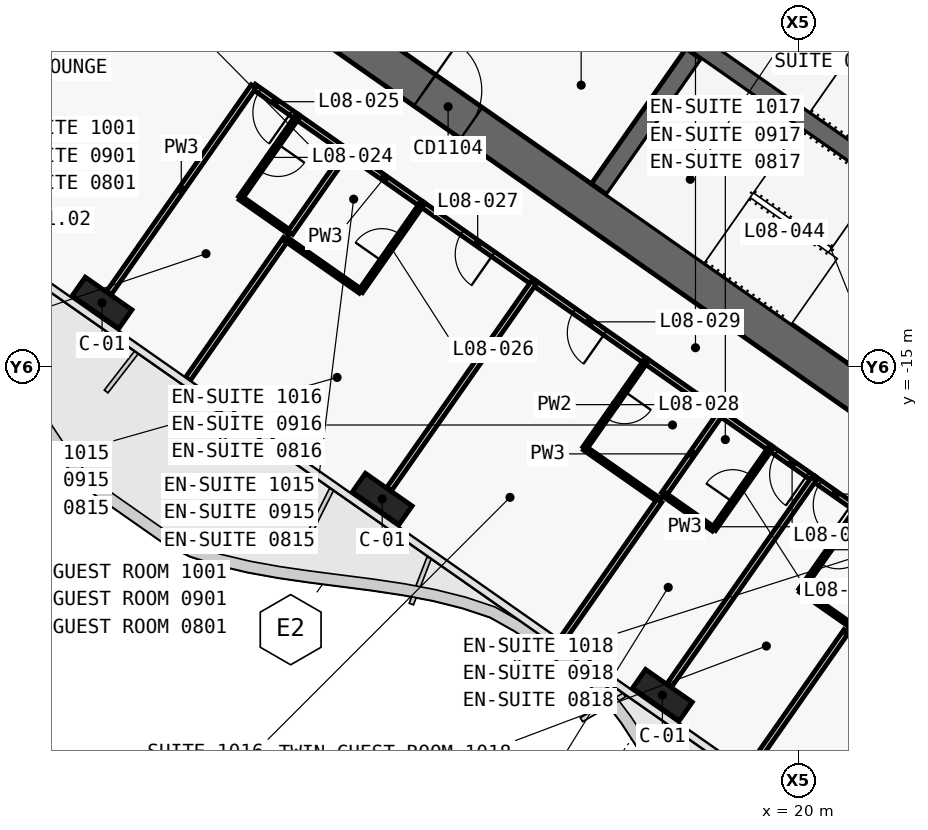
"""IFC4 building model, lengths in metres.
Left out: names, types, materials, properties, quantities, classifications, styles, units other than length and angle.
Written with IfcOpenShell. Run it as: python <this file> out.ifc"""

import sys

from ifc_helpers import new_model, si_unit, direction, frame, frame_2d, origin, origin_2d, place, context, subcontext, project, spatial, polyline, rectangle, outline, extrude, element, fill, save


model = new_model("IFC4")
c1 = context("Model", 3, precision=1e-05, world=origin(), true_north=direction((0.0, 1.0)))
c2 = subcontext(c1, "Body", "Model", "MODEL_VIEW")
j1 = project(units=[si_unit("LENGTHUNIT", "METRE"), si_unit("PLANEANGLEUNIT", "RADIAN")], contexts=[c1])
p1 = place(None, origin())
s1 = spatial("IfcSite", under=j1, at=p1, CompositionType="ELEMENT")
p2 = place(p1, origin())
s2 = spatial("IfcBuilding", under=s1, at=p2, CompositionType="ELEMENT")
p3 = place(p2, frame((0.0, 0.0, 54.5)))
s3 = spatial("IfcBuildingStorey", under=s2, at=p3, CompositionType="ELEMENT", Elevation=54.5)
p4 = place(p3, frame((-0.037, 11.867, 0.0), z_axis=(0.0, 0.0, 1.0), x_axis=(0.819155306259, -0.573571777746, 0.0)))
e1 = element("IfcWall", 1, at=p4, inside=s3, PredefinedType="SHEAR", context=c2, shape_type="SweptSolid", body=[
    extrude(outline(polyline([(33.837, 0.5), (0.0, 0.5), (0.7, -0.5), (33.837, -0.5), (33.837, 0.5)])), origin(), (0.0, 0.0, 1.0), 3.6),
])
p5 = place(p3, frame((-0.037, -0.585, 0.0), z_axis=(0.0, 0.0, 1.0), x_axis=(0.819157152511, -0.573569140985, 0.0)))
e2 = element("IfcWall", 2, at=p5, inside=s3, PredefinedType="SHEAR", context=c2, shape_type="SweptSolid", body=[
    extrude(outline(polyline([(26.695, 0.5), (0.0, 0.5), (0.7, -0.5), (26.695, -0.5), (26.695, 0.5)])), origin(), (0.0, 0.0, 1.0), 3.6),
])
p6 = place(p5, frame((6.695, 0.0, 0.0)))
e3 = element("IfcOpeningElement", 3, at=p6, cuts=e2, PredefinedType="OPENING", context=c2, shape_type="SweptSolid", body=[
    extrude(rectangle(XDim=1.5, YDim=2.1, at=frame_2d((0.75, 1.05))), frame((0.0, 0.51, 0.0), z_axis=(0.0, -1.0, 0.0), x_axis=(1.0, 0.0, 0.0)), (0.0, 0.0, 1.0), 1.02),
])
p7 = place(p5, frame((12.445, 0.0, 0.0)))
e4 = element("IfcOpeningElement", 4, at=p7, cuts=e2, PredefinedType="OPENING", context=c2, shape_type="SweptSolid", body=[
    extrude(rectangle(XDim=1.5, YDim=2.1, at=frame_2d((0.75, 1.05))), frame((0.0, 0.51, 0.0), z_axis=(0.0, -1.0, 0.0), x_axis=(1.0, 0.0, 0.0)), (0.0, 0.0, 1.0), 1.02),
])
p8 = place(p3, frame((14.745, -10.324, 0.0), z_axis=(0.0, 0.0, 1.0), x_axis=(0.57356780395, 0.819158088694, 0.0)))
e5 = element("IfcWall", 5, at=p8, inside=s3, PredefinedType="SHEAR", context=c2, shape_type="SweptSolid", body=[
    extrude(outline(polyline([(0.0, 0.25), (0.0, -0.25), (4.35, -0.25), (4.35, 0.25), (0.0, 0.25)])), origin(), (0.0, 0.0, 1.0), 3.6),
])
p9 = place(p3, frame((2.638, 3.768, 0.0), z_axis=(0.0, 0.0, 1.0), x_axis=(0.819148977158, -0.573580816643, 0.0)))
e6 = element("IfcWall", 6, at=p9, inside=s3, PredefinedType="SHEAR", context=c2, shape_type="SweptSolid", body=[
    extrude(outline(polyline([(0.0, 0.25), (0.0, -0.25), (26.0, -0.25), (26.0, 0.25), (0.0, 0.25)])), origin(), (0.0, 0.0, 1.0), 3.6),
])
p10 = place(p9, frame((9.637, 0.0, 0.0)))
e7 = element("IfcOpeningElement", 7, at=p10, cuts=e6, PredefinedType="OPENING", context=c2, shape_type="SweptSolid", body=[
    extrude(rectangle(XDim=1.2, YDim=2.1, at=frame_2d((0.6, 1.05))), frame((0.0, 0.26, 0.0), z_axis=(0.0, -1.0, 0.0), x_axis=(1.0, 0.0, 0.0)), (0.0, 0.0, 1.0), 0.52),
])
p11 = place(p9, frame((11.812, 0.0, 0.0)))
e8 = element("IfcOpeningElement", 8, at=p11, cuts=e6, PredefinedType="OPENING", context=c2, shape_type="SweptSolid", body=[
    extrude(rectangle(XDim=1.2, YDim=2.1, at=frame_2d((0.6, 1.05))), frame((0.0, 0.26, 0.0), z_axis=(0.0, -1.0, 0.0), x_axis=(1.0, 0.0, 0.0)), (0.0, 0.0, 1.0), 0.52),
])
p12 = place(p9, frame((13.988, 0.0, 0.0)))
e9 = element("IfcOpeningElement", 9, at=p12, cuts=e6, PredefinedType="OPENING", context=c2, shape_type="SweptSolid", body=[
    extrude(rectangle(XDim=1.2, YDim=2.1, at=frame_2d((0.6, 1.05))), frame((0.0, 0.26, 0.0), z_axis=(0.0, -1.0, 0.0), x_axis=(1.0, 0.0, 0.0)), (0.0, 0.0, 1.0), 0.52),
])
p13 = place(p9, frame((16.262, 0.0, 0.0)))
e10 = element("IfcOpeningElement", 10, at=p13, cuts=e6, PredefinedType="OPENING", context=c2, shape_type="SweptSolid", body=[
    extrude(rectangle(XDim=1.0, YDim=2.1, at=frame_2d((0.5, 1.05))), frame((0.0, 0.26, 0.0), z_axis=(0.0, -1.0, 0.0), x_axis=(1.0, 0.0, 0.0)), (0.0, 0.0, 1.0), 0.52),
])
for number, where, z_axis, x_axis in (
    (11, (1.665, -13.313, 0.0), (0.0, 0.0, 1.0), (0.819, -0.574, 0.0)),
    (12, (9.038, -18.475, 0.0), (0.0, 0.0, 1.0), (0.819, -0.574, 0.0)),
    (13, (16.41, -23.637, 0.0), (0.0, 0.0, 1.0), (0.819, -0.574, 0.0)),
):
    element("IfcColumn", number, at=place(p3, frame(where, z_axis=z_axis, x_axis=x_axis)), inside=s3, PredefinedType="COLUMN", context=c2, shape_type="SweptSolid", body=[
        extrude(rectangle(XDim=1.5, YDim=0.6, at=origin_2d()), origin(), (0.0, 0.0, 1.0), 3.6),
    ])
p14 = place(p3, frame((6.799, -8.423, 0.0), z_axis=(0.0, 0.0, 1.0), x_axis=(-0.819207359301, 0.573497430219, 0.0)))
e14 = element("IfcWall", 14, at=p14, inside=s3, PredefinedType="PARTITIONING", context=c2, shape_type="SweptSolid", body=[
    extrude(rectangle(XDim=1.401, YDim=0.15, at=frame_2d((0.7, 0.0))), origin(), (0.0, 0.0, 1.0), 2.6),
])
p15 = place(p14, frame((0.201, 0.0, 0.0)))
e15 = element("IfcOpeningElement", 15, at=p15, cuts=e14, PredefinedType="OPENING", context=c2, shape_type="SweptSolid", body=[
    extrude(rectangle(XDim=1.0, YDim=2.1, at=frame_2d((0.5, 1.05))), frame((0.0, 0.085, 0.0), z_axis=(0.0, -1.0, 0.0), x_axis=(1.0, 0.0, 0.0)), (0.0, 0.0, 1.0), 0.17),
])
p16 = place(p3, frame((8.111, -9.342, 0.0), z_axis=(0.0, 0.0, 1.0), x_axis=(-0.8190674132, 0.573697283098, 0.0)))
e16 = element("IfcWall", 16, at=p16, inside=s3, PredefinedType="PARTITIONING", context=c2, shape_type="SweptSolid", body=[
    extrude(rectangle(XDim=1.604, YDim=0.15, at=frame_2d((0.802, 0.0))), origin(), (0.0, 0.0, 1.0), 3.32),
])
p17 = place(p3, frame((13.026, -12.783, 0.0), z_axis=(0.0, 0.0, 1.0), x_axis=(-0.819145961204, 0.573585123798, 0.0)))
e17 = element("IfcWall", 17, at=p17, inside=s3, PredefinedType="PARTITIONING", context=c2, shape_type="SweptSolid", body=[
    extrude(rectangle(XDim=3.603, YDim=0.15, at=frame_2d((1.802, 0.0))), origin(), (0.0, 0.0, 1.0), 2.6),
])
p18 = place(p17, frame((1.302, 0.0, 0.0)))
e18 = element("IfcOpeningElement", 18, at=p18, cuts=e17, PredefinedType="OPENING", context=c2, shape_type="SweptSolid", body=[
    extrude(rectangle(XDim=1.0, YDim=2.1, at=frame_2d((0.5, 1.05))), frame((0.0, 0.085, 0.0), z_axis=(0.0, -1.0, 0.0), x_axis=(1.0, 0.0, 0.0)), (0.0, 0.0, 1.0), 0.17),
])
p19 = place(p3, frame((10.077, -10.718, 0.0), z_axis=(0.0, 0.0, 1.0), x_axis=(-0.819146032251, 0.573585022335, 0.0)))
e19 = element("IfcWall", 19, at=p19, inside=s3, PredefinedType="PARTITIONING", context=c2, shape_type="SweptSolid", body=[
    extrude(rectangle(XDim=2.404, YDim=0.15, at=frame_2d((1.202, 0.0))), origin(), (0.0, 0.0, 1.0), 3.32),
])
p20 = place(p3, frame((15.974, -14.847, 0.0), z_axis=(0.0, 0.0, 1.0), x_axis=(-0.819145961204, 0.573585123798, 0.0)))
e20 = element("IfcWall", 20, at=p20, inside=s3, PredefinedType="PARTITIONING", context=c2, shape_type="SweptSolid", body=[
    extrude(rectangle(XDim=3.603, YDim=0.15, at=frame_2d((1.802, 0.0))), origin(), (0.0, 0.0, 1.0), 2.6),
])
p21 = place(p20, frame((1.301, 0.0, 0.0)))
e21 = element("IfcOpeningElement", 21, at=p21, cuts=e20, PredefinedType="OPENING", context=c2, shape_type="SweptSolid", body=[
    extrude(rectangle(XDim=1.0, YDim=2.1, at=frame_2d((0.5, 1.05))), frame((0.0, 0.085, 0.0), z_axis=(0.0, -1.0, 0.0), x_axis=(1.0, 0.0, 0.0)), (0.0, 0.0, 1.0), 0.17),
])
p22 = place(p3, frame((17.941, -16.224, 0.0), z_axis=(0.0, 0.0, 1.0), x_axis=(-0.81922714955, 0.573469159974, 0.0)))
e22 = element("IfcWall", 22, at=p22, inside=s3, PredefinedType="PARTITIONING", context=c2, shape_type="SweptSolid", body=[
    extrude(rectangle(XDim=2.404, YDim=0.15, at=frame_2d((1.202, 0.0))), origin(), (0.0, 0.0, 1.0), 3.32),
])
p23 = place(p3, frame((20.398, -17.945, 0.0), z_axis=(0.0, 0.0, 1.0), x_axis=(-0.819060210533, 0.573707566205, 0.0)))
e23 = element("IfcWall", 23, at=p23, inside=s3, PredefinedType="PARTITIONING", context=c2, shape_type="SweptSolid", body=[
    extrude(rectangle(XDim=1.403, YDim=0.15, at=frame_2d((0.702, 0.0))), origin(), (0.0, 0.0, 1.0), 2.6),
])
p24 = place(p23, frame((0.202, 0.0, 0.0)))
e24 = element("IfcOpeningElement", 24, at=p24, cuts=e23, PredefinedType="OPENING", context=c2, shape_type="SweptSolid", body=[
    extrude(rectangle(XDim=1.0, YDim=2.1, at=frame_2d((0.5, 1.05))), frame((0.0, 0.085, 0.0), z_axis=(0.0, -1.0, 0.0), x_axis=(1.0, 0.0, 0.0)), (0.0, 0.0, 1.0), 0.17),
])
p25 = place(p3, frame((19.251, -17.142, 0.0), z_axis=(0.0, 0.0, 1.0), x_axis=(-0.819189013667, 0.573523634986, 0.0)))
e25 = element("IfcWall", 25, at=p25, inside=s3, PredefinedType="PARTITIONING", context=c2, shape_type="SweptSolid", body=[
    extrude(rectangle(XDim=1.604, YDim=0.15, at=frame_2d((0.802, 0.0))), origin(), (0.0, 0.0, 1.0), 3.32),
])
p26 = place(p3, frame((21.544, -18.748, 0.0), z_axis=(0.0, 0.0, 1.0), x_axis=(-0.81914197737, 0.573590813132, 0.0)))
e26 = element("IfcWall", 26, at=p26, inside=s3, PredefinedType="PARTITIONING", context=c2, shape_type="SweptSolid", body=[
    extrude(rectangle(XDim=1.403, YDim=0.15, at=frame_2d((0.701, 0.0))), origin(), (0.0, 0.0, 1.0), 2.6),
])
p27 = place(p26, frame((0.201, 0.0, 0.0)))
e27 = element("IfcOpeningElement", 27, at=p27, cuts=e26, PredefinedType="OPENING", context=c2, shape_type="SweptSolid", body=[
    extrude(rectangle(XDim=1.0, YDim=2.1, at=frame_2d((0.5, 1.05))), frame((0.0, 0.085, 0.0), z_axis=(0.0, -1.0, 0.0), x_axis=(1.0, 0.0, 0.0)), (0.0, 0.0, 1.0), 0.17),
])
p28 = place(p3, frame((6.798, -8.422, 0.0), z_axis=(0.0, 0.0, 1.0), x_axis=(-0.573537965655, -0.819178980414, 0.0)))
e28 = element("IfcWall", 28, at=p28, inside=s3, PredefinedType="PARTITIONING", context=c2, shape_type="SweptSolid", body=[
    extrude(rectangle(XDim=2.6, YDim=0.12, at=frame_2d((1.3, 0.0))), origin(), (0.0, 0.0, 1.0), 3.32),
])
p29 = place(p28, frame((0.875, 0.0, 0.0)))
e29 = element("IfcOpeningElement", 29, at=p29, cuts=e28, PredefinedType="OPENING", context=c2, shape_type="SweptSolid", body=[
    extrude(rectangle(XDim=0.85, YDim=2.05, at=frame_2d((0.425, 1.025))), frame((0.0, 0.07, 0.0), z_axis=(0.0, -1.0, 0.0), x_axis=(1.0, 0.0, 0.0)), (0.0, 0.0, 1.0), 0.14),
])
p30 = place(p3, frame((5.307, -10.553, 0.0), z_axis=(0.0, 0.0, 1.0), x_axis=(0.819131543282, -0.57360571371, 0.0)))
e30 = element("IfcWall", 30, at=p30, inside=s3, PredefinedType="PARTITIONING", context=c2, shape_type="SweptSolid", body=[
    extrude(rectangle(XDim=1.6, YDim=0.12, at=frame_2d((0.8, 0.0))), origin(), (0.0, 0.0, 1.0), 3.32),
])
p31 = place(p3, frame((6.504, -11.633, 0.0), z_axis=(0.0, 0.0, 1.0), x_axis=(-0.573556991349, -0.819165659482, 0.0)))
e31 = element("IfcWall", 31, at=p31, inside=s3, PredefinedType="PARTITIONING", context=c2, shape_type="SweptSolid", body=[
    extrude(rectangle(XDim=4.501, YDim=0.15, at=frame_2d((2.25, 0.0))), origin(), (0.0, 0.0, 1.0), 2.5),
])
p32 = place(p3, frame((1.849, -13.051, 0.0), z_axis=(0.0, 0.0, 1.0), x_axis=(0.57357355307, 0.819154063177, 0.0)))
e32 = element("IfcWall", 32, at=p32, inside=s3, PredefinedType="PARTITIONING", context=c2, shape_type="SweptSolid", body=[
    extrude(rectangle(XDim=6.63, YDim=0.15, at=frame_2d((3.315, 0.0))), origin(), (0.0, 0.0, 1.0), 2.6),
])
p33 = place(p3, frame((8.109, -9.34, 0.0), z_axis=(0.0, 0.0, 1.0), x_axis=(-0.573537965655, -0.819178980414, 0.0)))
e33 = element("IfcWall", 33, at=p33, inside=s3, PredefinedType="PARTITIONING", context=c2, shape_type="SweptSolid", body=[
    extrude(rectangle(XDim=2.6, YDim=0.15, at=frame_2d((1.3, 0.0))), origin(), (0.0, 0.0, 1.0), 3.32),
])
p34 = place(p3, frame((6.502, -11.635, 0.0), z_axis=(0.0, 0.0, 1.0), x_axis=(0.819141114317, -0.573592045652, 0.0)))
e34 = element("IfcWall", 34, at=p34, inside=s3, PredefinedType="PARTITIONING", context=c2, shape_type="SweptSolid", body=[
    extrude(rectangle(XDim=2.4, YDim=0.12, at=frame_2d((1.2, 0.0))), origin(), (0.0, 0.0, 1.0), 3.32),
])
p35 = place(p3, frame((8.47, -13.011, 0.0), z_axis=(0.0, 0.0, 1.0), x_axis=(0.573550118428, 0.819170471667, 0.0)))
e35 = element("IfcWall", 35, at=p35, inside=s3, PredefinedType="PARTITIONING", context=c2, shape_type="SweptSolid", body=[
    extrude(rectangle(XDim=2.8, YDim=0.12, at=frame_2d((1.4, 0.0))), origin(), (0.0, 0.0, 1.0), 3.32),
])
p36 = place(p35, frame((0.975, 0.0, 0.0)))
e36 = element("IfcOpeningElement", 36, at=p36, cuts=e35, PredefinedType="OPENING", context=c2, shape_type="SweptSolid", body=[
    extrude(rectangle(XDim=0.85, YDim=2.05, at=frame_2d((0.425, 1.025))), frame((0.0, 0.07, 0.0), z_axis=(0.0, -1.0, 0.0), x_axis=(1.0, 0.0, 0.0)), (0.0, 0.0, 1.0), 0.14),
])
p37 = place(p3, frame((13.024, -12.782, 0.0), z_axis=(0.0, 0.0, 1.0), x_axis=(-0.573556251799, -0.819166177294, 0.0)))
e37 = element("IfcWall", 37, at=p37, inside=s3, PredefinedType="PARTITIONING", context=c2, shape_type="SweptSolid", body=[
    extrude(rectangle(XDim=6.63, YDim=0.15, at=frame_2d((3.315, 0.0))), origin(), (0.0, 0.0, 1.0), 2.6),
])
p38 = place(p3, frame((15.972, -14.846, 0.0), z_axis=(0.0, 0.0, 1.0), x_axis=(-0.573550118428, -0.819170471667, 0.0)))
e38 = element("IfcWall", 38, at=p38, inside=s3, PredefinedType="PARTITIONING", context=c2, shape_type="SweptSolid", body=[
    extrude(rectangle(XDim=2.8, YDim=0.12, at=frame_2d((1.4, 0.0))), origin(), (0.0, 0.0, 1.0), 3.32),
])
p39 = place(p38, frame((0.975, 0.0, 0.0)))
e39 = element("IfcOpeningElement", 39, at=p39, cuts=e38, PredefinedType="OPENING", context=c2, shape_type="SweptSolid", body=[
    extrude(rectangle(XDim=0.85, YDim=2.05, at=frame_2d((0.425, 1.025))), frame((0.0, 0.07, 0.0), z_axis=(0.0, -1.0, 0.0), x_axis=(1.0, 0.0, 0.0)), (0.0, 0.0, 1.0), 0.14),
])
p40 = place(p3, frame((14.366, -17.141, 0.0), z_axis=(0.0, 0.0, 1.0), x_axis=(0.819155442668, -0.573571582932, 0.0)))
e40 = element("IfcWall", 40, at=p40, inside=s3, PredefinedType="PARTITIONING", context=c2, shape_type="SweptSolid", body=[
    extrude(rectangle(XDim=2.4, YDim=0.12, at=frame_2d((1.2, 0.0))), origin(), (0.0, 0.0, 1.0), 3.32),
])
p41 = place(p3, frame((16.332, -18.518, 0.0), z_axis=(0.0, 0.0, 1.0), x_axis=(-0.573564311442, -0.819160534108, 0.0)))
e41 = element("IfcWall", 41, at=p41, inside=s3, PredefinedType="PARTITIONING", context=c2, shape_type="SweptSolid", body=[
    extrude(rectangle(XDim=4.499, YDim=0.15, at=frame_2d((2.25, 0.0))), origin(), (0.0, 0.0, 1.0), 2.5),
])
p42 = place(p3, frame((17.939, -16.223, 0.0), z_axis=(0.0, 0.0, 1.0), x_axis=(-0.573588285102, -0.819143747577, 0.0)))
e42 = element("IfcWall", 42, at=p42, inside=s3, PredefinedType="PARTITIONING", context=c2, shape_type="SweptSolid", body=[
    extrude(rectangle(XDim=2.602, YDim=0.15, at=frame_2d((1.301, 0.0))), origin(), (0.0, 0.0, 1.0), 3.32),
])
p43 = place(p3, frame((16.447, -18.354, 0.0), z_axis=(0.0, 0.0, 1.0), x_axis=(0.819253425856, -0.573431621227, 0.0)))
e43 = element("IfcWall", 43, at=p43, inside=s3, PredefinedType="PARTITIONING", context=c2, shape_type="SweptSolid", body=[
    extrude(rectangle(XDim=1.6, YDim=0.12, at=frame_2d((0.8, 0.0))), origin(), (0.0, 0.0, 1.0), 3.32),
])
p44 = place(p3, frame((17.759, -19.271, 0.0), z_axis=(0.0, 0.0, 1.0), x_axis=(0.573600972199, 0.819134863556, 0.0)))
e44 = element("IfcWall", 44, at=p44, inside=s3, PredefinedType="PARTITIONING", context=c2, shape_type="SweptSolid", body=[
    extrude(rectangle(XDim=2.6, YDim=0.12, at=frame_2d((1.3, 0.0))), origin(), (0.0, 0.0, 1.0), 3.32),
])
p45 = place(p44, frame((0.875, 0.0, 0.0)))
e45 = element("IfcOpeningElement", 45, at=p45, cuts=e44, PredefinedType="OPENING", context=c2, shape_type="SweptSolid", body=[
    extrude(rectangle(XDim=0.85, YDim=2.05, at=frame_2d((0.425, 1.025))), frame((0.0, 0.07, 0.0), z_axis=(0.0, -1.0, 0.0), x_axis=(1.0, 0.0, 0.0)), (0.0, 0.0, 1.0), 0.14),
])
p46 = place(p3, frame((20.396, -17.944, 0.0), z_axis=(0.0, 0.0, 1.0), x_axis=(-0.57359826181, -0.819136761505, 0.0)))
e46 = element("IfcWall", 46, at=p46, inside=s3, PredefinedType="PARTITIONING", context=c2, shape_type="SweptSolid", body=[
    extrude(rectangle(XDim=6.63, YDim=0.15, at=frame_2d((3.315, 0.0))), origin(), (0.0, 0.0, 1.0), 2.6),
])
p47 = place(p3, frame((21.542, -18.747, 0.0), z_axis=(0.0, 0.0, 1.0), x_axis=(-0.573645091666, -0.819103967032, 0.0)))
e47 = element("IfcWall", 47, at=p47, inside=s3, PredefinedType="PARTITIONING", context=c2, shape_type="SweptSolid", body=[
    extrude(rectangle(XDim=2.6, YDim=0.12, at=frame_2d((1.3, 0.0))), origin(), (0.0, 0.0, 1.0), 3.32),
])
p48 = place(p47, frame((0.875, 0.0, 0.0)))
e48 = element("IfcOpeningElement", 48, at=p48, cuts=e47, PredefinedType="OPENING", context=c2, shape_type="SweptSolid", body=[
    extrude(rectangle(XDim=0.85, YDim=2.05, at=frame_2d((0.425, 1.025))), frame((0.0, 0.07, 0.0), z_axis=(0.0, -1.0, 0.0), x_axis=(1.0, 0.0, 0.0)), (0.0, 0.0, 1.0), 0.14),
])
p49 = place(p3, frame((20.051, -20.878, 0.0), z_axis=(0.0, 0.0, 1.0), x_axis=(0.81918174131, -0.573534022273, 0.0)))
e49 = element("IfcWall", 49, at=p49, inside=s3, PredefinedType="PARTITIONING", context=c2, shape_type="SweptSolid", body=[
    extrude(rectangle(XDim=1.6, YDim=0.12, at=frame_2d((0.8, 0.0))), origin(), (0.0, 0.0, 1.0), 3.32),
])
p50 = place(p3, frame((21.248, -21.958, 0.0), z_axis=(0.0, 0.0, 1.0), x_axis=(-0.573556991349, -0.819165659482, 0.0)))
e50 = element("IfcWall", 50, at=p50, inside=s3, PredefinedType="PARTITIONING", context=c2, shape_type="SweptSolid", body=[
    extrude(rectangle(XDim=4.501, YDim=0.15, at=frame_2d((2.25, 0.0))), origin(), (0.0, 0.0, 1.0), 2.5),
])
p51 = place(p3, frame((21.247, -21.959, 0.0), z_axis=(0.0, 0.0, 1.0), x_axis=(0.819155442668, -0.573571582932, 0.0)))
e51 = element("IfcWall", 51, at=p51, inside=s3, PredefinedType="PARTITIONING", context=c2, shape_type="SweptSolid", body=[
    extrude(rectangle(XDim=2.4, YDim=0.12, at=frame_2d((1.2, 0.0))), origin(), (0.0, 0.0, 1.0), 3.32),
])
p52 = place(p7, origin())
e52 = element("IfcDoor", 52, at=p52, inside=s3, OperationType="DOUBLE_DOOR_SINGLE_SWING", PredefinedType="DOOR", context=c2, shape_type="SweptSolid", body=[
    extrude(rectangle(XDim=1.5, YDim=2.1, at=frame_2d((0.75, 1.05))), frame((0.0, 0.025, 0.0), z_axis=(0.0, -1.0, 0.0), x_axis=(1.0, 0.0, 0.0)), (0.0, 0.0, 1.0), 0.05),
])
fill(e4, e52)
p53 = place(p29, origin())
e53 = element("IfcDoor", 53, at=p53, inside=s3, OperationType="SINGLE_SWING_LEFT", PredefinedType="DOOR", context=c2, shape_type="SweptSolid", body=[
    extrude(rectangle(XDim=0.85, YDim=2.05, at=frame_2d((0.425, 1.025))), frame((0.0, 0.025, 0.0), z_axis=(0.0, -1.0, 0.0), x_axis=(1.0, 0.0, 0.0)), (0.0, 0.0, 1.0), 0.05),
])
fill(e29, e53)
p54 = place(p15, origin())
e54 = element("IfcDoor", 54, at=p54, inside=s3, OperationType="SINGLE_SWING_RIGHT", PredefinedType="DOOR", context=c2, shape_type="SweptSolid", body=[
    extrude(rectangle(XDim=1.0, YDim=2.1, at=frame_2d((0.5, 1.05))), frame((0.0, 0.025, 0.0), z_axis=(0.0, -1.0, 0.0), x_axis=(1.0, 0.0, 0.0)), (0.0, 0.0, 1.0), 0.05),
])
fill(e15, e54)
p55 = place(p36, origin())
e55 = element("IfcDoor", 55, at=p55, inside=s3, OperationType="SINGLE_SWING_RIGHT", PredefinedType="DOOR", context=c2, shape_type="SweptSolid", body=[
    extrude(rectangle(XDim=0.85, YDim=2.05, at=frame_2d((0.425, 1.025))), frame((0.0, 0.025, 0.0), z_axis=(0.0, -1.0, 0.0), x_axis=(1.0, 0.0, 0.0)), (0.0, 0.0, 1.0), 0.05),
])
fill(e36, e55)
p56 = place(p18, origin())
e56 = element("IfcDoor", 56, at=p56, inside=s3, OperationType="SINGLE_SWING_LEFT", PredefinedType="DOOR", context=c2, shape_type="SweptSolid", body=[
    extrude(rectangle(XDim=1.0, YDim=2.1, at=frame_2d((0.5, 1.05))), frame((0.0, 0.025, 0.0), z_axis=(0.0, -1.0, 0.0), x_axis=(1.0, 0.0, 0.0)), (0.0, 0.0, 1.0), 0.05),
])
fill(e18, e56)
p57 = place(p39, origin())
e57 = element("IfcDoor", 57, at=p57, inside=s3, OperationType="SINGLE_SWING_RIGHT", PredefinedType="DOOR", context=c2, shape_type="SweptSolid", body=[
    extrude(rectangle(XDim=0.85, YDim=2.05, at=frame_2d((0.425, 1.025))), frame((0.0, 0.025, 0.0), z_axis=(0.0, -1.0, 0.0), x_axis=(1.0, 0.0, 0.0)), (0.0, 0.0, 1.0), 0.05),
])
fill(e39, e57)
p58 = place(p21, origin())
e58 = element("IfcDoor", 58, at=p58, inside=s3, OperationType="SINGLE_SWING_LEFT", PredefinedType="DOOR", context=c2, shape_type="SweptSolid", body=[
    extrude(rectangle(XDim=1.0, YDim=2.1, at=frame_2d((0.5, 1.05))), frame((0.0, 0.025, 0.0), z_axis=(0.0, -1.0, 0.0), x_axis=(1.0, 0.0, 0.0)), (0.0, 0.0, 1.0), 0.05),
])
fill(e21, e58)
p59 = place(p45, origin())
e59 = element("IfcDoor", 59, at=p59, inside=s3, OperationType="SINGLE_SWING_LEFT", PredefinedType="DOOR", context=c2, shape_type="SweptSolid", body=[
    extrude(rectangle(XDim=0.85, YDim=2.05, at=frame_2d((0.425, 1.025))), frame((0.0, 0.025, 0.0), z_axis=(0.0, -1.0, 0.0), x_axis=(1.0, 0.0, 0.0)), (0.0, 0.0, 1.0), 0.05),
])
fill(e45, e59)
p60 = place(p24, origin())
e60 = element("IfcDoor", 60, at=p60, inside=s3, OperationType="SINGLE_SWING_RIGHT", PredefinedType="DOOR", context=c2, shape_type="SweptSolid", body=[
    extrude(rectangle(XDim=1.0, YDim=2.1, at=frame_2d((0.5, 1.05))), frame((0.0, 0.025, 0.0), z_axis=(0.0, -1.0, 0.0), x_axis=(1.0, 0.0, 0.0)), (0.0, 0.0, 1.0), 0.05),
])
fill(e24, e60)
p61 = place(p48, origin())
e61 = element("IfcDoor", 61, at=p61, inside=s3, OperationType="SINGLE_SWING_LEFT", PredefinedType="DOOR", context=c2, shape_type="SweptSolid", body=[
    extrude(rectangle(XDim=0.85, YDim=2.05, at=frame_2d((0.425, 1.025))), frame((0.0, 0.025, 0.0), z_axis=(0.0, -1.0, 0.0), x_axis=(1.0, 0.0, 0.0)), (0.0, 0.0, 1.0), 0.05),
])
fill(e48, e61)
p62 = place(p27, origin())
e62 = element("IfcDoor", 62, at=p62, inside=s3, OperationType="SINGLE_SWING_RIGHT", PredefinedType="DOOR", context=c2, shape_type="SweptSolid", body=[
    extrude(rectangle(XDim=1.0, YDim=2.1, at=frame_2d((0.5, 1.05))), frame((0.0, 0.025, 0.0), z_axis=(0.0, -1.0, 0.0), x_axis=(1.0, 0.0, 0.0)), (0.0, 0.0, 1.0), 0.05),
])
fill(e27, e62)
save(model, sys.argv[1])
